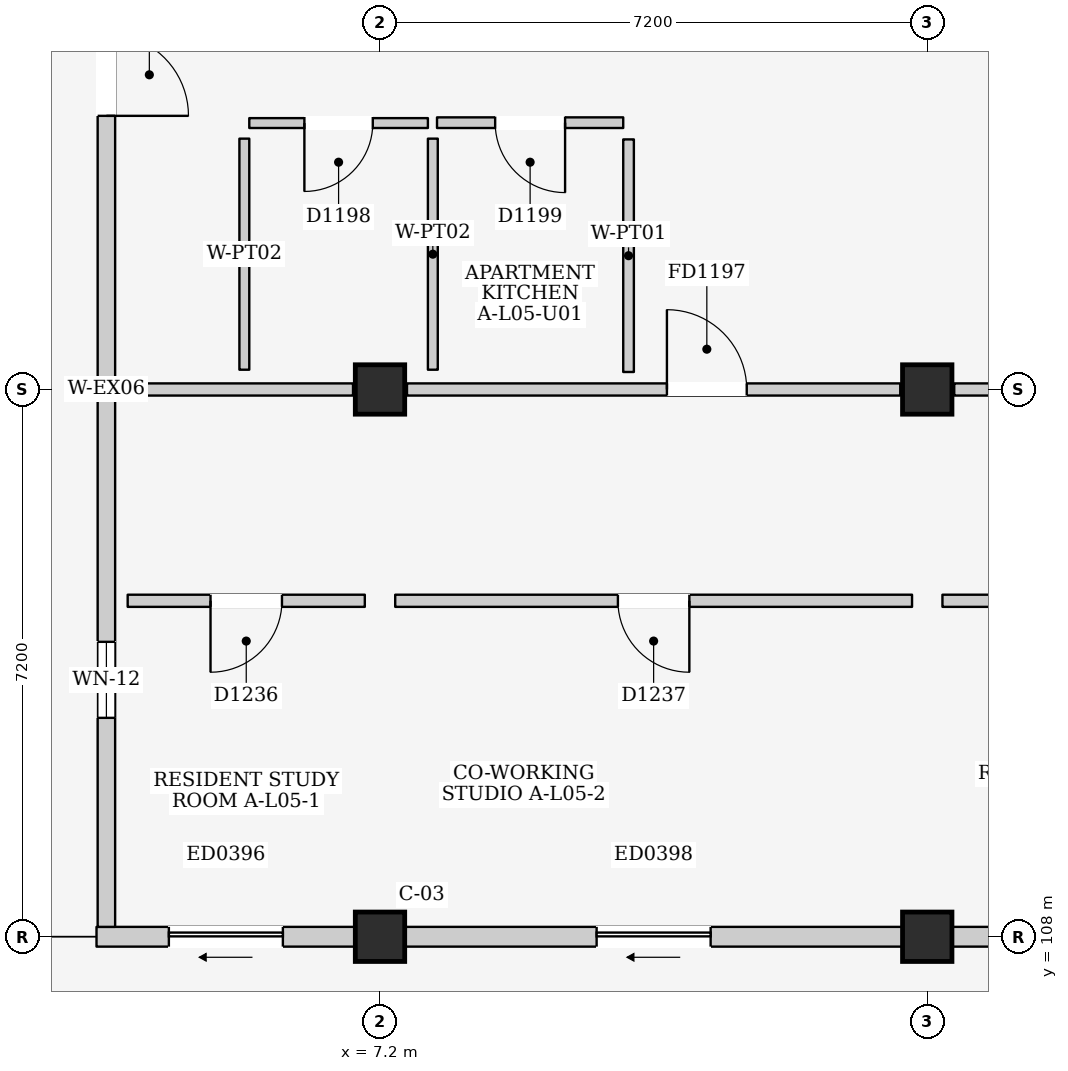
"""IFC4 building model, lengths in metres.
Left out: names, types, materials, properties, quantities, classifications, styles, units other than length and angle.
Written with IfcOpenShell. Run it as: python <this file> out.ifc"""

import sys

from ifc_helpers import new_model, si_unit, direction, frame, frame_2d, origin, origin_2d, place, context, subcontext, project, spatial, rectangle, extrude, element, fill, save


model = new_model("IFC4")
c1 = context("Model", 3, precision=1e-05, world=origin(), true_north=direction((0.0, 1.0)))
c2 = subcontext(c1, "Body", "Model", "MODEL_VIEW")
j1 = project(units=[si_unit("LENGTHUNIT", "METRE"), si_unit("PLANEANGLEUNIT", "RADIAN")], contexts=[c1])
p1 = place(None, origin())
s1 = spatial("IfcSite", under=j1, at=p1, CompositionType="ELEMENT")
p2 = place(p1, origin())
s2 = spatial("IfcBuilding", under=s1, at=p2, CompositionType="ELEMENT")
p3 = place(p2, frame((0.0, 0.0, 18.6)))
s3 = spatial("IfcBuildingStorey", under=s2, at=p3, CompositionType="ELEMENT", Elevation=18.6)
for number, where, z_axis, x_axis in (
    (1, (7.2, 108.0, 0.0), (0.0, 0.0, 1.0), (1.0, 0.0, 0.0)),
    (2, (7.2, 115.2, 0.0), (0.0, 0.0, 1.0), (1.0, 0.0, 0.0)),
    (3, (14.4, 108.0, 0.0), (0.0, 0.0, 1.0), (1.0, 0.0, 0.0)),
    (4, (14.4, 115.2, 0.0), (0.0, 0.0, 1.0), (1.0, 0.0, 0.0)),
):
    element("IfcColumn", number, at=place(p3, frame(where, z_axis=z_axis, x_axis=x_axis)), inside=s3, PredefinedType="COLUMN", context=c2, shape_type="SweptSolid", body=[
        extrude(rectangle(XDim=0.65, YDim=0.65, at=origin_2d()), origin(), (0.0, 0.0, 1.0), 3.3),
    ])
p4 = place(p3, frame((3.47, 108.0, 0.0), z_axis=(0.0, 0.0, 1.0), x_axis=(1.0, 0.0, 0.0)))
e5 = element("IfcWall", 5, at=p4, inside=s3, PredefinedType="ELEMENTEDWALL", context=c2, shape_type="SweptSolid", body=[
    extrude(rectangle(XDim=3.405, YDim=0.26, at=frame_2d((1.703, 0.0))), origin(), (0.0, 0.0, 1.0), 2.395),
])
p5 = place(p4, frame((0.952, 0.0, 0.0)))
e6 = element("IfcOpeningElement", 6, at=p5, cuts=e5, PredefinedType="OPENING", context=c2, shape_type="SweptSolid", body=[
    extrude(rectangle(XDim=1.5, YDim=2.12, at=frame_2d((0.75, 1.06))), frame((0.0, 0.145, 0.0), z_axis=(0.0, -1.0, 0.0), x_axis=(1.0, 0.0, 0.0)), (0.0, 0.0, 1.0), 0.29),
])
p6 = place(p3, frame((7.525, 108.0, 0.0), z_axis=(0.0, 0.0, 1.0), x_axis=(1.0, 0.0, 0.0)))
e7 = element("IfcWall", 7, at=p6, inside=s3, PredefinedType="ELEMENTEDWALL", context=c2, shape_type="SweptSolid", body=[
    extrude(rectangle(XDim=6.55, YDim=0.26, at=frame_2d((3.275, 0.0))), origin(), (0.0, 0.0, 1.0), 2.395),
])
p7 = place(p6, frame((2.525, 0.0, 0.0)))
e8 = element("IfcOpeningElement", 8, at=p7, cuts=e7, PredefinedType="OPENING", context=c2, shape_type="SweptSolid", body=[
    extrude(rectangle(XDim=1.5, YDim=2.12, at=frame_2d((0.75, 1.06))), frame((0.0, 0.145, 0.0), z_axis=(0.0, -1.0, 0.0), x_axis=(1.0, 0.0, 0.0)), (0.0, 0.0, 1.0), 0.29),
])
p8 = place(p3, frame((14.725, 108.0, 0.0), z_axis=(0.0, 0.0, 1.0), x_axis=(1.0, 0.0, 0.0)))
e9 = element("IfcWall", 9, at=p8, inside=s3, PredefinedType="ELEMENTEDWALL", context=c2, shape_type="SweptSolid", body=[
    extrude(rectangle(XDim=6.55, YDim=0.26, at=frame_2d((3.275, 0.0))), origin(), (0.0, 0.0, 1.0), 2.395),
])
p9 = place(p8, frame((2.525, 0.0, 0.0)))
e10 = element("IfcOpeningElement", 10, at=p9, cuts=e9, PredefinedType="OPENING", context=c2, shape_type="SweptSolid", body=[
    extrude(rectangle(XDim=1.5, YDim=2.12, at=frame_2d((0.75, 1.06))), frame((0.0, 0.145, 0.0), z_axis=(0.0, -1.0, 0.0), x_axis=(1.0, 0.0, 0.0)), (0.0, 0.0, 1.0), 0.29),
])
p10 = place(p3, frame((3.6, 108.13, 0.0), z_axis=(0.0, 0.0, 1.0), x_axis=(0.0, 1.0, 0.0)))
e11 = element("IfcWall", 11, at=p10, inside=s3, PredefinedType="ELEMENTEDWALL", context=c2, shape_type="SweptSolid", body=[
    extrude(rectangle(XDim=7.07, YDim=0.23, at=frame_2d((3.535, 0.0))), origin(), (0.0, 0.0, 1.0), 2.495),
])
p11 = place(p10, frame((2.75, 0.0, 1.1)))
e12 = element("IfcOpeningElement", 12, at=p11, cuts=e11, PredefinedType="OPENING", context=c2, shape_type="SweptSolid", body=[
    extrude(rectangle(XDim=1.0, YDim=0.9, at=frame_2d((0.5, 0.45))), frame((0.0, 0.13, 0.0), z_axis=(0.0, -1.0, 0.0), x_axis=(1.0, 0.0, 0.0)), (0.0, 0.0, 1.0), 0.26),
])
p12 = place(p3, frame((3.6, 115.2, 0.0), z_axis=(0.0, 0.0, 1.0), x_axis=(0.0, 1.0, 0.0)))
e13 = element("IfcWall", 13, at=p12, inside=s3, PredefinedType="ELEMENTEDWALL", context=c2, shape_type="SweptSolid", body=[
    extrude(rectangle(XDim=7.07, YDim=0.23, at=frame_2d((3.535, 0.0))), origin(), (0.0, 0.0, 1.0), 2.495),
])
p13 = place(p12, frame((3.6, 0.0, 0.0)))
e14 = element("IfcOpeningElement", 14, at=p13, cuts=e13, PredefinedType="OPENING", context=c2, shape_type="SweptSolid", body=[
    extrude(rectangle(XDim=1.08, YDim=2.12, at=frame_2d((0.54, 1.06))), frame((0.0, 0.13, 0.0), z_axis=(0.0, -1.0, 0.0), x_axis=(1.0, 0.0, 0.0)), (0.0, 0.0, 1.0), 0.26),
])
p14 = place(p3, frame((3.88, 115.2, 0.0), z_axis=(0.0, 0.0, 1.0), x_axis=(1.0, 0.0, 0.0)))
e15 = element("IfcWall", 15, at=p14, inside=s3, PredefinedType="PARTITIONING", context=c2, shape_type="SweptSolid", body=[
    extrude(rectangle(XDim=2.965, YDim=0.16, at=frame_2d((1.482, 0.0))), origin(), (0.0, 0.0, 1.0), 2.395),
])
p15 = place(p3, frame((7.555, 115.2, 0.0), z_axis=(0.0, 0.0, 1.0), x_axis=(1.0, 0.0, 0.0)))
e16 = element("IfcWall", 16, at=p15, inside=s3, PredefinedType="PARTITIONING", context=c2, shape_type="SweptSolid", body=[
    extrude(rectangle(XDim=6.49, YDim=0.16, at=frame_2d((3.245, 0.0))), origin(), (0.0, 0.0, 1.0), 2.395),
])
p16 = place(p15, frame((3.42, 0.0, 0.0)))
e17 = element("IfcOpeningElement", 17, at=p16, cuts=e16, PredefinedType="OPENING", context=c2, shape_type="SweptSolid", body=[
    extrude(rectangle(XDim=1.05, YDim=2.15, at=frame_2d((0.525, 1.075))), frame((0.0, 0.095, 0.0), z_axis=(0.0, -1.0, 0.0), x_axis=(1.0, 0.0, 0.0)), (0.0, 0.0, 1.0), 0.19),
])
p17 = place(p3, frame((14.755, 115.2, 0.0), z_axis=(0.0, 0.0, 1.0), x_axis=(1.0, 0.0, 0.0)))
e18 = element("IfcWall", 18, at=p17, inside=s3, PredefinedType="PARTITIONING", context=c2, shape_type="SweptSolid", body=[
    extrude(rectangle(XDim=6.49, YDim=0.16, at=frame_2d((3.245, 0.0))), origin(), (0.0, 0.0, 1.0), 2.395),
])
p18 = place(p3, frame((5.48, 118.705, 0.0), z_axis=(0.0, 0.0, 1.0), x_axis=(1.0, 0.0, 0.0)))
e19 = element("IfcWall", 19, at=p18, inside=s3, PredefinedType="PARTITIONING", context=c2, shape_type="SweptSolid", body=[
    extrude(rectangle(XDim=2.35, YDim=0.13, at=frame_2d((1.175, 0.0))), origin(), (0.0, 0.0, 1.0), 3.06),
])
p19 = place(p18, frame((0.725, 0.0, 0.0)))
e20 = element("IfcOpeningElement", 20, at=p19, cuts=e19, PredefinedType="OPENING", context=c2, shape_type="SweptSolid", body=[
    extrude(rectangle(XDim=0.9, YDim=2.1, at=frame_2d((0.45, 1.05))), frame((0.0, 0.08, 0.0), z_axis=(0.0, -1.0, 0.0), x_axis=(1.0, 0.0, 0.0)), (0.0, 0.0, 1.0), 0.16),
])
for number, where, z_axis, x_axis in (
    (21, (7.895, 115.46, 0.0), (0.0, 0.0, 1.0), (0.0, 1.0, 0.0)),
    (22, (5.415, 115.46, 0.0), (0.0, 0.0, 1.0), (0.0, 1.0, 0.0)),
):
    element("IfcWall", number, at=place(p3, frame(where, z_axis=z_axis, x_axis=x_axis)), inside=s3, PredefinedType="PARTITIONING", context=c2, shape_type="SweptSolid", body=[
        extrude(rectangle(XDim=3.04, YDim=0.13, at=frame_2d((1.52, 0.0))), origin(), (0.0, 0.0, 1.0), 3.06),
    ])
p20 = place(p3, frame((7.95, 118.71, 0.0), z_axis=(0.0, 0.0, 1.0), x_axis=(1.0, 0.0, 0.0)))
e23 = element("IfcWall", 23, at=p20, inside=s3, PredefinedType="PARTITIONING", context=c2, shape_type="SweptSolid", body=[
    extrude(rectangle(XDim=2.45, YDim=0.14, at=frame_2d((1.225, 0.0))), origin(), (0.0, 0.0, 1.0), 3.06),
])
p21 = place(p20, frame((0.765, 0.0, 0.0)))
e24 = element("IfcOpeningElement", 24, at=p21, cuts=e23, PredefinedType="OPENING", context=c2, shape_type="SweptSolid", body=[
    extrude(rectangle(XDim=0.92, YDim=2.1, at=frame_2d((0.46, 1.05))), frame((0.0, 0.085, 0.0), z_axis=(0.0, -1.0, 0.0), x_axis=(1.0, 0.0, 0.0)), (0.0, 0.0, 1.0), 0.17),
])
p22 = place(p3, frame((10.47, 115.43, 0.0), z_axis=(0.0, 0.0, 1.0), x_axis=(0.0, 1.0, 0.0)))
e25 = element("IfcWall", 25, at=p22, inside=s3, PredefinedType="PARTITIONING", context=c2, shape_type="SweptSolid", body=[
    extrude(rectangle(XDim=3.06, YDim=0.14, at=frame_2d((1.53, 0.0))), origin(), (0.0, 0.0, 1.0), 3.06),
])
p23 = place(p3, frame((3.88, 112.42, 0.0), z_axis=(0.0, 0.0, 1.0), x_axis=(1.0, 0.0, 0.0)))
e26 = element("IfcWall", 26, at=p23, inside=s3, PredefinedType="PARTITIONING", context=c2, shape_type="SweptSolid", body=[
    extrude(rectangle(XDim=3.12, YDim=0.16, at=frame_2d((1.56, 0.0))), origin(), (0.0, 0.0, 1.0), 3.06),
])
p24 = place(p23, frame((1.09, 0.0, 0.0)))
e27 = element("IfcOpeningElement", 27, at=p24, cuts=e26, PredefinedType="OPENING", context=c2, shape_type="SweptSolid", body=[
    extrude(rectangle(XDim=0.94, YDim=2.12, at=frame_2d((0.47, 1.06))), frame((0.0, 0.095, 0.0), z_axis=(0.0, -1.0, 0.0), x_axis=(1.0, 0.0, 0.0)), (0.0, 0.0, 1.0), 0.19),
])
p25 = place(p3, frame((7.4, 112.42, 0.0), z_axis=(0.0, 0.0, 1.0), x_axis=(1.0, 0.0, 0.0)))
e28 = element("IfcWall", 28, at=p25, inside=s3, PredefinedType="PARTITIONING", context=c2, shape_type="SweptSolid", body=[
    extrude(rectangle(XDim=6.8, YDim=0.16, at=frame_2d((3.4, 0.0))), origin(), (0.0, 0.0, 1.0), 3.06),
])
p26 = place(p25, frame((2.93, 0.0, 0.0)))
e29 = element("IfcOpeningElement", 29, at=p26, cuts=e28, PredefinedType="OPENING", context=c2, shape_type="SweptSolid", body=[
    extrude(rectangle(XDim=0.94, YDim=2.12, at=frame_2d((0.47, 1.06))), frame((0.0, 0.095, 0.0), z_axis=(0.0, -1.0, 0.0), x_axis=(1.0, 0.0, 0.0)), (0.0, 0.0, 1.0), 0.19),
])
p27 = place(p3, frame((14.6, 112.42, 0.0), z_axis=(0.0, 0.0, 1.0), x_axis=(1.0, 0.0, 0.0)))
e30 = element("IfcWall", 30, at=p27, inside=s3, PredefinedType="PARTITIONING", context=c2, shape_type="SweptSolid", body=[
    extrude(rectangle(XDim=6.8, YDim=0.16, at=frame_2d((3.4, 0.0))), origin(), (0.0, 0.0, 1.0), 3.06),
])
p28 = place(p27, frame((2.93, 0.0, 0.0)))
e31 = element("IfcOpeningElement", 31, at=p28, cuts=e30, PredefinedType="OPENING", context=c2, shape_type="SweptSolid", body=[
    extrude(rectangle(XDim=0.94, YDim=2.12, at=frame_2d((0.47, 1.06))), frame((0.0, 0.095, 0.0), z_axis=(0.0, -1.0, 0.0), x_axis=(1.0, 0.0, 0.0)), (0.0, 0.0, 1.0), 0.19),
])
p29 = place(p5, frame((1.5, 0.0, 0.0), z_axis=(0.0, 0.0, 1.0), x_axis=(-1.0, 0.0, 0.0)))
e32 = element("IfcDoor", 32, at=p29, inside=s3, OperationType="SLIDING_TO_LEFT", PredefinedType="DOOR", context=c2, shape_type="SweptSolid", body=[
    extrude(rectangle(XDim=1.5, YDim=2.12, at=frame_2d((0.75, 1.06))), frame((0.0, 0.025, 0.0), z_axis=(0.0, -1.0, 0.0), x_axis=(1.0, 0.0, 0.0)), (0.0, 0.0, 1.0), 0.05),
])
fill(e6, e32)
p30 = place(p7, frame((1.5, 0.0, 0.0), z_axis=(0.0, 0.0, 1.0), x_axis=(-1.0, 0.0, 0.0)))
e33 = element("IfcDoor", 33, at=p30, inside=s3, OperationType="SLIDING_TO_LEFT", PredefinedType="DOOR", context=c2, shape_type="SweptSolid", body=[
    extrude(rectangle(XDim=1.5, YDim=2.12, at=frame_2d((0.75, 1.06))), frame((0.0, 0.025, 0.0), z_axis=(0.0, -1.0, 0.0), x_axis=(1.0, 0.0, 0.0)), (0.0, 0.0, 1.0), 0.05),
])
fill(e8, e33)
p31 = place(p11, origin())
e34 = element("IfcWindow", 34, at=p31, inside=s3, PartitioningType="SINGLE_PANEL", PredefinedType="WINDOW", context=c2, shape_type="SweptSolid", body=[
    extrude(rectangle(XDim=1.0, YDim=0.9, at=frame_2d((0.5, 0.45))), frame((0.0, 0.03, 0.0), z_axis=(0.0, -1.0, 0.0), x_axis=(1.0, 0.0, 0.0)), (0.0, 0.0, 1.0), 0.06),
])
fill(e12, e34)
p32 = place(p13, frame((1.08, 0.0, 0.0), z_axis=(0.0, 0.0, 1.0), x_axis=(-1.0, 0.0, 0.0)))
e35 = element("IfcDoor", 35, at=p32, inside=s3, OperationType="SINGLE_SWING_RIGHT", PredefinedType="DOOR", context=c2, shape_type="SweptSolid", body=[
    extrude(rectangle(XDim=1.08, YDim=2.12, at=frame_2d((0.54, 1.06))), frame((0.0, 0.025, 0.0), z_axis=(0.0, -1.0, 0.0), x_axis=(1.0, 0.0, 0.0)), (0.0, 0.0, 1.0), 0.05),
])
fill(e14, e35)
p33 = place(p16, origin())
e36 = element("IfcDoor", 36, at=p33, inside=s3, OperationType="SINGLE_SWING_LEFT", PredefinedType="DOOR", context=c2, shape_type="SweptSolid", body=[
    extrude(rectangle(XDim=1.05, YDim=2.15, at=frame_2d((0.525, 1.075))), frame((0.0, 0.025, 0.0), z_axis=(0.0, -1.0, 0.0), x_axis=(1.0, 0.0, 0.0)), (0.0, 0.0, 1.0), 0.05),
])
fill(e17, e36)
p34 = place(p19, frame((0.9, 0.0, 0.0), z_axis=(0.0, 0.0, 1.0), x_axis=(-1.0, 0.0, 0.0)))
e37 = element("IfcDoor", 37, at=p34, inside=s3, OperationType="SINGLE_SWING_RIGHT", PredefinedType="DOOR", context=c2, shape_type="SweptSolid", body=[
    extrude(rectangle(XDim=0.9, YDim=2.1, at=frame_2d((0.45, 1.05))), frame((0.0, 0.025, 0.0), z_axis=(0.0, -1.0, 0.0), x_axis=(1.0, 0.0, 0.0)), (0.0, 0.0, 1.0), 0.05),
])
fill(e20, e37)
p35 = place(p21, frame((0.92, 0.0, 0.0), z_axis=(0.0, 0.0, 1.0), x_axis=(-1.0, 0.0, 0.0)))
e38 = element("IfcDoor", 38, at=p35, inside=s3, OperationType="SINGLE_SWING_LEFT", PredefinedType="DOOR", context=c2, shape_type="SweptSolid", body=[
    extrude(rectangle(XDim=0.92, YDim=2.1, at=frame_2d((0.46, 1.05))), frame((0.0, 0.025, 0.0), z_axis=(0.0, -1.0, 0.0), x_axis=(1.0, 0.0, 0.0)), (0.0, 0.0, 1.0), 0.05),
])
fill(e24, e38)
p36 = place(p24, frame((0.94, 0.0, 0.0), z_axis=(0.0, 0.0, 1.0), x_axis=(-1.0, 0.0, 0.0)))
e39 = element("IfcDoor", 39, at=p36, inside=s3, OperationType="SINGLE_SWING_RIGHT", PredefinedType="DOOR", context=c2, shape_type="SweptSolid", body=[
    extrude(rectangle(XDim=0.94, YDim=2.12, at=frame_2d((0.47, 1.06))), frame((0.0, 0.025, 0.0), z_axis=(0.0, -1.0, 0.0), x_axis=(1.0, 0.0, 0.0)), (0.0, 0.0, 1.0), 0.05),
])
fill(e27, e39)
p37 = place(p26, frame((0.94, 0.0, 0.0), z_axis=(0.0, 0.0, 1.0), x_axis=(-1.0, 0.0, 0.0)))
e40 = element("IfcDoor", 40, at=p37, inside=s3, OperationType="SINGLE_SWING_LEFT", PredefinedType="DOOR", context=c2, shape_type="SweptSolid", body=[
    extrude(rectangle(XDim=0.94, YDim=2.12, at=frame_2d((0.47, 1.06))), frame((0.0, 0.025, 0.0), z_axis=(0.0, -1.0, 0.0), x_axis=(1.0, 0.0, 0.0)), (0.0, 0.0, 1.0), 0.05),
])
fill(e29, e40)
save(model, sys.argv[1])
